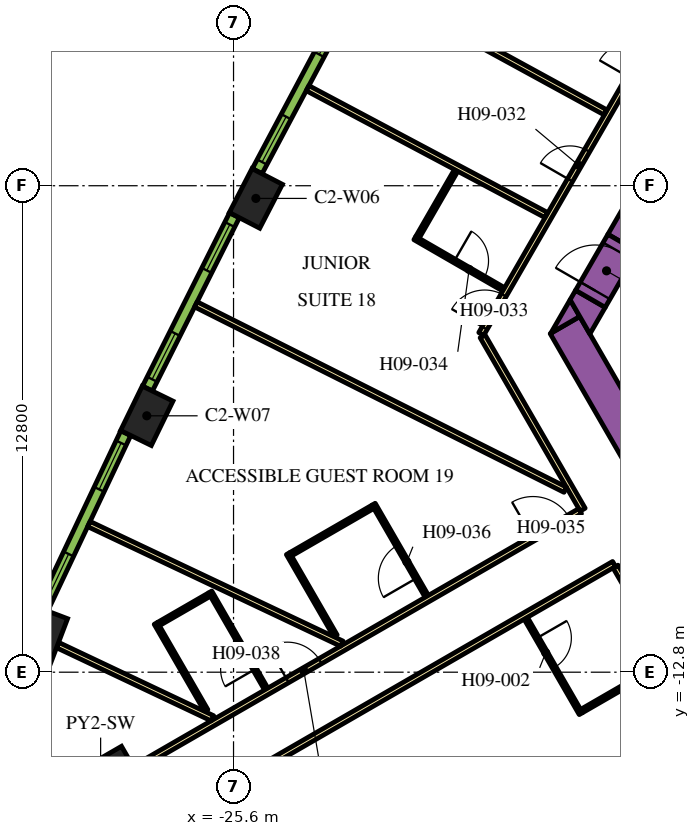
"""IFC4 building model, lengths in metres.
Left out: names, types, materials, properties, quantities, classifications, styles, units other than length and angle.
Written with IfcOpenShell. Run it as: python <this file> out.ifc"""

import sys

from ifc_helpers import new_model, si_unit, direction, frame, frame_2d, origin, origin_2d, place, context, subcontext, project, spatial, polyline, rectangle, outline, extrude, element, fill, save


model = new_model("IFC4")
c1 = context("Model", 3, precision=1e-05, world=origin(), true_north=direction((0.0, 1.0)))
c2 = subcontext(c1, "Body", "Model", "MODEL_VIEW")
j1 = project(units=[si_unit("LENGTHUNIT", "METRE"), si_unit("PLANEANGLEUNIT", "RADIAN")], contexts=[c1])
p1 = place(None, origin())
s1 = spatial("IfcSite", under=j1, at=p1, CompositionType="ELEMENT")
p2 = place(p1, origin())
s2 = spatial("IfcBuilding", under=s1, at=p2, CompositionType="ELEMENT")
p3 = place(p2, frame((0.0, 0.0, 122.7)))
s3 = spatial("IfcBuildingStorey", under=s2, at=p3, CompositionType="ELEMENT", Elevation=122.7)
p4 = place(p3, frame((-29.097, -16.799, 0.0), z_axis=(0.0, 0.0, 1.0), x_axis=(-0.866025403784, -0.5, 0.0)))
e1 = element("IfcColumn", 1, at=p4, inside=s3, PredefinedType="COLUMN", context=c2, shape_type="SweptSolid", body=[
    extrude(rectangle(XDim=3.0, YDim=3.0, at=origin_2d()), origin(), (0.0, 0.0, 1.0), 3.9),
])
for number, where, z_axis, x_axis in (
    (2, (-25.012, -0.334, 0.0), (0.0, 0.0, 1.0), (-0.459, -0.888, 0.0)),
    (3, (-27.883, -6.054, 0.0), (0.0, 0.0, 1.0), (-0.438, -0.899, 0.0)),
    (4, (-30.619, -11.839, 0.0), (0.0, 0.0, 1.0), (-0.355, -0.935, 0.0)),
):
    element("IfcColumn", number, at=place(p3, frame(where, z_axis=z_axis, x_axis=x_axis)), inside=s3, PredefinedType="COLUMN", context=c2, shape_type="SweptSolid", body=[
        extrude(rectangle(XDim=1.3, YDim=0.9, at=origin_2d()), origin(), (0.0, 0.0, 1.0), 3.9),
    ])
p5 = place(p3, frame((-15.36, -1.503, 0.0), z_axis=(0.0, 0.0, 1.0), x_axis=(0.50000389221, 0.866023156604, 0.0)))
e5 = element("IfcWall", 5, at=p5, inside=s3, PredefinedType="SOLIDWALL", context=c2, shape_type="SweptSolid", body=[
    extrude(rectangle(XDim=21.0, YDim=0.9, at=frame_2d((10.5, 0.0))), origin(), (0.0, 0.0, 1.0), 3.9),
])
p6 = place(p3, frame((-12.134, -11.883, 0.0), z_axis=(0.0, 0.0, 1.0), x_axis=(-0.500005339912, 0.866022320763, 0.0)))
e6 = element("IfcWall", 6, at=p6, inside=s3, PredefinedType="SOLIDWALL", context=c2, shape_type="SweptSolid", body=[
    extrude(rectangle(XDim=9.488, YDim=0.9, at=frame_2d((4.744, 0.0))), origin(), (0.0, 0.0, 1.0), 3.9),
])
p7 = place(p3, origin())
e7 = element("IfcWall", 7, at=p7, inside=s3, PredefinedType="SOLIDWALL", context=c2, shape_type="SweptSolid", body=[
    extrude(outline(polyline([(-16.489, -3.44), (-17.251, -3.88), (-16.743, -3.0), (-16.489, -3.44)])), origin(), (0.0, 0.0, 1.0), 3.9),
])
e8 = element("IfcWall", 8, at=p7, inside=s3, PredefinedType="SOLIDWALL", context=c2, shape_type="SweptSolid", body=[
    extrude(outline(polyline([(-15.82, -3.201), (-16.223, -3.9), (-16.743, -3.0), (-16.599, -2.751), (-15.82, -3.201)])), origin(), (0.0, 0.0, 1.0), 3.9),
])
p8 = place(p3, frame((-16.209, -2.976, 0.0), z_axis=(0.0, 0.0, 1.0), x_axis=(0.499954529098, 0.86605165483, 0.0)))
e9 = element("IfcWall", 9, at=p8, inside=s3, PredefinedType="SOLIDWALL", context=c2, shape_type="SweptSolid", body=[
    extrude(rectangle(XDim=1.7, YDim=0.9, at=frame_2d((0.85, 0.0))), origin(), (0.0, 0.0, 1.0), 3.9),
])
p9 = place(p8, frame((0.25, 0.0, 0.0)))
e10 = element("IfcOpeningElement", 10, at=p9, cuts=e9, PredefinedType="OPENING", context=c2, shape_type="SweptSolid", body=[
    extrude(rectangle(XDim=1.2, YDim=2.1, at=frame_2d((0.6, 1.05))), frame((0.0, 0.46, 0.0), z_axis=(0.0, -1.0, 0.0), x_axis=(1.0, 0.0, 0.0)), (0.0, 0.0, 1.0), 0.92),
])
p10 = place(p3, frame((-19.081, -3.9, 0.0), z_axis=(0.0, 0.0, 1.0), x_axis=(0.499998313975, 0.866026377209, 0.0)))
e11 = element("IfcWall", 11, at=p10, inside=s3, PredefinedType="PARTITIONING", context=c2, shape_type="SweptSolid", body=[
    extrude(rectangle(XDim=25.766, YDim=0.15, at=frame_2d((12.883, 0.0))), origin(), (0.0, 0.0, 1.0), 2.75),
])
p11 = place(p10, frame((19.306, 0.0, 0.0)))
e12 = element("IfcOpeningElement", 12, at=p11, cuts=e11, PredefinedType="OPENING", context=c2, shape_type="SweptSolid", body=[
    extrude(rectangle(XDim=1.0, YDim=2.1, at=frame_2d((0.5, 1.05))), frame((0.0, 0.085, 0.0), z_axis=(0.0, -1.0, 0.0), x_axis=(1.0, 0.0, 0.0)), (0.0, 0.0, 1.0), 0.17),
])
p12 = place(p10, frame((18.0, 0.0, 0.0)))
e13 = element("IfcOpeningElement", 13, at=p12, cuts=e11, PredefinedType="OPENING", context=c2, shape_type="SweptSolid", body=[
    extrude(rectangle(XDim=1.0, YDim=2.1, at=frame_2d((0.5, 1.05))), frame((0.0, 0.085, 0.0), z_axis=(0.0, -1.0, 0.0), x_axis=(1.0, 0.0, 0.0)), (0.0, 0.0, 1.0), 0.17),
])
p13 = place(p10, frame((7.793, 0.0, 0.0)))
e14 = element("IfcOpeningElement", 14, at=p13, cuts=e11, PredefinedType="OPENING", context=c2, shape_type="SweptSolid", body=[
    extrude(rectangle(XDim=0.9, YDim=2.1, at=frame_2d((0.45, 1.05))), frame((0.0, 0.085, 0.0), z_axis=(0.0, -1.0, 0.0), x_axis=(1.0, 0.0, 0.0)), (0.0, 0.0, 1.0), 0.17),
])
p14 = place(p10, frame((4.674, 0.0, 0.0)))
e15 = element("IfcOpeningElement", 15, at=p14, cuts=e11, PredefinedType="OPENING", context=c2, shape_type="SweptSolid", body=[
    extrude(rectangle(XDim=0.9, YDim=2.1, at=frame_2d((0.45, 1.05))), frame((0.0, 0.085, 0.0), z_axis=(0.0, -1.0, 0.0), x_axis=(1.0, 0.0, 0.0)), (0.0, 0.0, 1.0), 0.17),
])
p15 = place(p10, frame((0.18, 0.0, 0.0)))
e16 = element("IfcOpeningElement", 16, at=p15, cuts=e11, PredefinedType="OPENING", context=c2, shape_type="SweptSolid", body=[
    extrude(rectangle(XDim=1.0, YDim=2.1, at=frame_2d((0.5, 1.05))), frame((0.0, 0.085, 0.0), z_axis=(0.0, -1.0, 0.0), x_axis=(1.0, 0.0, 0.0)), (0.0, 0.0, 1.0), 0.17),
])
p16 = place(p3, frame((-16.412, -8.523, 0.0), z_axis=(0.0, 0.0, 1.0), x_axis=(-0.500001929737, 0.866024289647, 0.0)))
e17 = element("IfcWall", 17, at=p16, inside=s3, PredefinedType="PARTITIONING", context=c2, shape_type="SweptSolid", body=[
    extrude(rectangle(XDim=5.268, YDim=0.15, at=frame_2d((2.634, 0.0))), origin(), (0.0, 0.0, 1.0), 2.75),
])
p17 = place(p3, frame((-28.211, -15.335, 0.0), z_axis=(0.0, 0.0, 1.0), x_axis=(0.866025884867, 0.49999916674, 0.0)))
e18 = element("IfcWall", 18, at=p17, inside=s3, PredefinedType="PARTITIONING", context=c2, shape_type="SweptSolid", body=[
    extrude(rectangle(XDim=13.543, YDim=0.15, at=frame_2d((6.772, 0.0))), origin(), (0.0, 0.0, 1.0), 2.75),
])
p18 = place(p17, frame((12.114, 0.0, 0.0)))
e19 = element("IfcOpeningElement", 19, at=p18, cuts=e18, PredefinedType="OPENING", context=c2, shape_type="SweptSolid", body=[
    extrude(rectangle(XDim=1.1, YDim=2.1, at=frame_2d((0.55, 1.05))), frame((0.0, 0.085, 0.0), z_axis=(0.0, -1.0, 0.0), x_axis=(1.0, 0.0, 0.0)), (0.0, 0.0, 1.0), 0.17),
])
p19 = place(p17, frame((4.65, 0.0, 0.0)))
e20 = element("IfcOpeningElement", 20, at=p19, cuts=e18, PredefinedType="OPENING", context=c2, shape_type="SweptSolid", body=[
    extrude(rectangle(XDim=1.0, YDim=2.1, at=frame_2d((0.5, 1.05))), frame((0.0, 0.085, 0.0), z_axis=(0.0, -1.0, 0.0), x_axis=(1.0, 0.0, 0.0)), (0.0, 0.0, 1.0), 0.17),
])
p20 = place(p3, frame((-15.587, -9.952, 0.0), z_axis=(0.0, 0.0, 1.0), x_axis=(-0.866017869832, -0.500013048961, 0.0)))
e21 = element("IfcWall", 21, at=p20, inside=s3, PredefinedType="PARTITIONING", context=c2, shape_type="SweptSolid", body=[
    extrude(rectangle(XDim=13.624, YDim=0.15, at=frame_2d((6.812, 0.0))), origin(), (0.0, 0.0, 1.0), 2.75),
])
p21 = place(p20, frame((12.344, 0.0, 0.0)))
e22 = element("IfcOpeningElement", 22, at=p21, cuts=e21, PredefinedType="OPENING", context=c2, shape_type="SweptSolid", body=[
    extrude(rectangle(XDim=1.1, YDim=2.1, at=frame_2d((0.55, 1.05))), frame((0.0, 0.085, 0.0), z_axis=(0.0, -1.0, 0.0), x_axis=(1.0, 0.0, 0.0)), (0.0, 0.0, 1.0), 0.17),
])
p22 = place(p3, frame((-12.918, -14.575, 0.0), z_axis=(0.0, 0.0, 1.0), x_axis=(-0.500009150678, 0.866020120573, 0.0)))
e23 = element("IfcWall", 23, at=p22, inside=s3, PredefinedType="PARTITIONING", context=c2, shape_type="SweptSolid", body=[
    extrude(rectangle(XDim=5.258, YDim=0.15, at=frame_2d((2.629, 0.0))), origin(), (0.0, 0.0, 1.0), 2.75),
])
p23 = place(p3, frame((-30.231, -12.085, 0.0), z_axis=(0.0, 0.0, 1.0), x_axis=(0.904001132572, -0.427530060122, 0.0)))
e24 = element("IfcWall", 24, at=p23, inside=s3, PredefinedType="PARTITIONING", context=c2, shape_type="SweptSolid", body=[
    extrude(rectangle(XDim=4.51, YDim=0.15, at=frame_2d((2.255, 0.0))), origin(), (0.0, 0.0, 1.0), 2.75),
])
p24 = place(p3, frame((-29.406, -8.901, 0.0), z_axis=(0.0, 0.0, 1.0), x_axis=(0.904002363742, -0.427527456836, 0.0)))
e25 = element("IfcWall", 25, at=p24, inside=s3, PredefinedType="PARTITIONING", context=c2, shape_type="SweptSolid", body=[
    extrude(rectangle(XDim=7.362, YDim=0.15, at=frame_2d((3.681, 0.0))), origin(), (0.0, 0.0, 1.0), 2.75),
])
p25 = place(p3, frame((-23.652, 2.567, 0.0), z_axis=(0.0, 0.0, 1.0), x_axis=(0.883019237957, -0.469336793144, 0.0)))
e26 = element("IfcWall", 26, at=p25, inside=s3, PredefinedType="PARTITIONING", context=c2, shape_type="SweptSolid", body=[
    extrude(rectangle(XDim=7.111, YDim=0.15, at=frame_2d((3.555, 0.0))), origin(), (0.0, 0.0, 1.0), 2.75),
])
p26 = place(p3, frame((-26.591, -3.122, 0.0), z_axis=(0.0, 0.0, 1.0), x_axis=(0.893766213273, -0.448533115847, 0.0)))
e27 = element("IfcWall", 27, at=p26, inside=s3, PredefinedType="PARTITIONING", context=c2, shape_type="SweptSolid", body=[
    extrude(rectangle(XDim=10.875, YDim=0.15, at=frame_2d((5.438, 0.0))), origin(), (0.0, 0.0, 1.0), 2.75),
])
p27 = place(p3, frame((-21.614, 5.102, 0.0), z_axis=(0.0, 0.0, 1.0), x_axis=(0.877484555087, -0.479604895287, 0.0)))
e28 = element("IfcWall", 28, at=p27, inside=s3, PredefinedType="PARTITIONING", context=c2, shape_type="SweptSolid", body=[
    extrude(rectangle(XDim=6.611, YDim=0.15, at=frame_2d((3.306, 0.0))), origin(), (0.0, 0.0, 1.0), 2.75),
])
p28 = place(p3, frame((-17.91, -11.38, 0.0), z_axis=(0.0, 0.0, 1.0), x_axis=(0.499987231761, -0.866032775405, 0.0)))
e29 = element("IfcWall", 29, at=p28, inside=s3, PredefinedType="PARTITIONING", context=c2, shape_type="SweptSolid", body=[
    extrude(rectangle(XDim=2.9, YDim=0.1, at=frame_2d((1.45, 0.0))), origin(), (0.0, 0.0, 1.0), 2.75),
])
p29 = place(p28, frame((0.6, 0.0, 0.0)))
e30 = element("IfcOpeningElement", 30, at=p29, cuts=e29, PredefinedType="OPENING", context=c2, shape_type="SweptSolid", body=[
    extrude(rectangle(XDim=0.9, YDim=2.1, at=frame_2d((0.45, 1.05))), frame((0.0, 0.06, 0.0), z_axis=(0.0, -1.0, 0.0), x_axis=(1.0, 0.0, 0.0)), (0.0, 0.0, 1.0), 0.12),
])
p30 = place(p3, frame((-16.442, -13.823, 0.0), z_axis=(0.0, 0.0, 1.0), x_axis=(0.866021400173, 0.500006934395, 0.0)))
e31 = element("IfcWall", 31, at=p30, inside=s3, PredefinedType="PARTITIONING", context=c2, shape_type="SweptSolid", body=[
    extrude(rectangle(XDim=2.6, YDim=0.1, at=frame_2d((1.3, 0.0))), origin(), (0.0, 0.0, 1.0), 2.75),
])
p31 = place(p3, frame((-20.829, -1.377, 0.0), z_axis=(0.0, 0.0, 1.0), x_axis=(0.866036505625, -0.499980770555, 0.0)))
e32 = element("IfcWall", 32, at=p31, inside=s3, PredefinedType="PARTITIONING", context=c2, shape_type="SweptSolid", body=[
    extrude(rectangle(XDim=2.7, YDim=0.1, at=frame_2d((1.35, 0.0))), origin(), (0.0, 0.0, 1.0), 2.75),
])
p32 = place(p31, frame((1.2, 0.0, 0.0)))
e33 = element("IfcOpeningElement", 33, at=p32, cuts=e32, PredefinedType="OPENING", context=c2, shape_type="SweptSolid", body=[
    extrude(rectangle(XDim=0.9, YDim=2.1, at=frame_2d((0.45, 1.05))), frame((0.0, 0.06, 0.0), z_axis=(0.0, -1.0, 0.0), x_axis=(1.0, 0.0, 0.0)), (0.0, 0.0, 1.0), 0.12),
])
p33 = place(p3, frame((-20.761, -1.359, 0.0), z_axis=(0.0, 0.0, 1.0), x_axis=(0.499954962928, 0.866051404389, 0.0)))
e34 = element("IfcWall", 34, at=p33, inside=s3, PredefinedType="PARTITIONING", context=c2, shape_type="SweptSolid", body=[
    extrude(rectangle(XDim=2.03, YDim=0.1, at=frame_2d((1.015, 0.0))), origin(), (0.0, 0.0, 1.0), 2.75),
])
p34 = place(p3, frame((-20.515, -10.805, 0.0), z_axis=(0.0, 0.0, 1.0), x_axis=(-0.49994636267, 0.866056369097, 0.0)))
e35 = element("IfcWall", 35, at=p34, inside=s3, PredefinedType="PARTITIONING", context=c2, shape_type="SweptSolid", body=[
    extrude(rectangle(XDim=2.8, YDim=0.1, at=frame_2d((1.4, 0.0))), origin(), (0.0, 0.0, 1.0), 2.75),
])
p35 = place(p34, frame((0.55, 0.0, 0.0)))
e36 = element("IfcOpeningElement", 36, at=p35, cuts=e35, PredefinedType="OPENING", context=c2, shape_type="SweptSolid", body=[
    extrude(rectangle(XDim=1.0, YDim=2.1, at=frame_2d((0.5, 1.05))), frame((0.0, 0.06, 0.0), z_axis=(0.0, -1.0, 0.0), x_axis=(1.0, 0.0, 0.0)), (0.0, 0.0, 1.0), 0.12),
])
for number, where, z_axis, x_axis in (
    (37, (-21.933, -8.448, 0.0), (0.0, 0.0, 1.0), (-0.866, -0.5, 0.0)),
    (38, (-22.916, -11.845, 0.0), (0.0, 0.0, 1.0), (-0.5, 0.866, 0.0)),
):
    element("IfcWall", number, at=place(p3, frame(where, z_axis=z_axis, x_axis=x_axis)), inside=s3, PredefinedType="PARTITIONING", context=c2, shape_type="SweptSolid", body=[
        extrude(rectangle(XDim=2.5, YDim=0.1, at=frame_2d((1.25, 0.0))), origin(), (0.0, 0.0, 1.0), 2.75),
    ])
p36 = place(p3, frame((-24.74, -13.244, 0.0), z_axis=(0.0, 0.0, 1.0), x_axis=(-0.500037662692, 0.866003658127, 0.0)))
e39 = element("IfcWall", 39, at=p36, inside=s3, PredefinedType="PARTITIONING", context=c2, shape_type="SweptSolid", body=[
    extrude(rectangle(XDim=2.95, YDim=0.1, at=frame_2d((1.475, 0.0))), origin(), (0.0, 0.0, 1.0), 2.75),
])
p37 = place(p36, frame((0.6, 0.0, 0.0)))
e40 = element("IfcOpeningElement", 40, at=p37, cuts=e39, PredefinedType="OPENING", context=c2, shape_type="SweptSolid", body=[
    extrude(rectangle(XDim=0.9, YDim=2.1, at=frame_2d((0.45, 1.05))), frame((0.0, 0.06, 0.0), z_axis=(0.0, -1.0, 0.0), x_axis=(1.0, 0.0, 0.0)), (0.0, 0.0, 1.0), 0.12),
])
p38 = place(p3, frame((-26.233, -10.758, 0.0), z_axis=(0.0, 0.0, 1.0), x_axis=(-0.866043940782, -0.499967891604, 0.0)))
e41 = element("IfcWall", 41, at=p38, inside=s3, PredefinedType="PARTITIONING", context=c2, shape_type="SweptSolid", body=[
    extrude(rectangle(XDim=1.55, YDim=0.1, at=frame_2d((0.775, 0.0))), origin(), (0.0, 0.0, 1.0), 2.75),
])
p39 = place(p3, frame((-26.319, -13.81, 0.0), z_axis=(0.0, 0.0, 1.0), x_axis=(-0.499953715521, 0.866052124492, 0.0)))
e42 = element("IfcWall", 42, at=p39, inside=s3, PredefinedType="PARTITIONING", context=c2, shape_type="SweptSolid", body=[
    extrude(rectangle(XDim=2.65, YDim=0.1, at=frame_2d((1.325, 0.0))), origin(), (0.0, 0.0, 1.0), 2.75),
])
p40 = place(p3, frame((-22.583, 4.887, 0.0), z_axis=(0.0, 0.0, 1.0), x_axis=(-0.469323203119, -0.883026461106, 0.0)))
e43 = element("IfcWall", 43, at=p40, inside=s3, PredefinedType="SOLIDWALL", context=c2, shape_type="SweptSolid", body=[
    extrude(rectangle(XDim=5.101, YDim=0.29, at=frame_2d((2.55, 0.0))), origin(), (0.0, 0.0, 1.0), 3.65),
])
p41 = place(p40, frame((0.273, 0.0, 0.9)))
e44 = element("IfcOpeningElement", 44, at=p41, cuts=e43, PredefinedType="OPENING", context=c2, shape_type="SweptSolid", body=[
    extrude(rectangle(XDim=1.35, YDim=2.15, at=frame_2d((0.675, 1.075))), frame((0.0, 0.155, 0.0), z_axis=(0.0, -1.0, 0.0), x_axis=(1.0, 0.0, 0.0)), (0.0, 0.0, 1.0), 0.31),
])
p42 = place(p40, frame((3.478, 0.0, 0.9)))
e45 = element("IfcOpeningElement", 45, at=p42, cuts=e43, PredefinedType="OPENING", context=c2, shape_type="SweptSolid", body=[
    extrude(rectangle(XDim=1.35, YDim=2.15, at=frame_2d((0.675, 1.075))), frame((0.0, 0.155, 0.0), z_axis=(0.0, -1.0, 0.0), x_axis=(1.0, 0.0, 0.0)), (0.0, 0.0, 1.0), 0.31),
])
p43 = place(p3, frame((-25.576, -0.778, 0.0), z_axis=(0.0, 0.0, 1.0), x_axis=(-0.448534297211, -0.893765620409, 0.0)))
e46 = element("IfcWall", 46, at=p43, inside=s3, PredefinedType="SOLIDWALL", context=c2, shape_type="SweptSolid", body=[
    extrude(rectangle(XDim=5.1, YDim=0.29, at=frame_2d((2.55, 0.0))), origin(), (0.0, 0.0, 1.0), 3.65),
])
p44 = place(p43, frame((0.272, 0.0, 0.9)))
e47 = element("IfcOpeningElement", 47, at=p44, cuts=e46, PredefinedType="OPENING", context=c2, shape_type="SweptSolid", body=[
    extrude(rectangle(XDim=1.35, YDim=2.15, at=frame_2d((0.675, 1.075))), frame((0.0, 0.155, 0.0), z_axis=(0.0, -1.0, 0.0), x_axis=(1.0, 0.0, 0.0)), (0.0, 0.0, 1.0), 0.31),
])
p45 = place(p43, frame((3.478, 0.0, 0.9)))
e48 = element("IfcOpeningElement", 48, at=p45, cuts=e46, PredefinedType="OPENING", context=c2, shape_type="SweptSolid", body=[
    extrude(rectangle(XDim=1.35, YDim=2.15, at=frame_2d((0.675, 1.075))), frame((0.0, 0.155, 0.0), z_axis=(0.0, -1.0, 0.0), x_axis=(1.0, 0.0, 0.0)), (0.0, 0.0, 1.0), 0.31),
])
p46 = place(p3, frame((-28.436, -6.511, 0.0), z_axis=(0.0, 0.0, 1.0), x_axis=(-0.427543726596, -0.903994669148, 0.0)))
e49 = element("IfcWall", 49, at=p46, inside=s3, PredefinedType="SOLIDWALL", context=c2, shape_type="SweptSolid", body=[
    extrude(rectangle(XDim=5.107, YDim=0.29, at=frame_2d((2.553, 0.0))), origin(), (0.0, 0.0, 1.0), 3.65),
])
p47 = place(p46, frame((0.285, 0.0, 0.9)))
e50 = element("IfcOpeningElement", 50, at=p47, cuts=e49, PredefinedType="OPENING", context=c2, shape_type="SweptSolid", body=[
    extrude(rectangle(XDim=1.35, YDim=2.15, at=frame_2d((0.675, 1.075))), frame((0.0, 0.155, 0.0), z_axis=(0.0, -1.0, 0.0), x_axis=(1.0, 0.0, 0.0)), (0.0, 0.0, 1.0), 0.31),
])
p48 = place(p46, frame((3.516, 0.0, 0.9)))
e51 = element("IfcOpeningElement", 51, at=p48, cuts=e49, PredefinedType="OPENING", context=c2, shape_type="SweptSolid", body=[
    extrude(rectangle(XDim=1.35, YDim=2.15, at=frame_2d((0.675, 1.075))), frame((0.0, 0.155, 0.0), z_axis=(0.0, -1.0, 0.0), x_axis=(1.0, 0.0, 0.0)), (0.0, 0.0, 1.0), 0.31),
])
p49 = place(p9, origin())
e52 = element("IfcDoor", 52, at=p49, inside=s3, OperationType="SINGLE_SWING_LEFT", PredefinedType="DOOR", context=c2, shape_type="SweptSolid", body=[
    extrude(rectangle(XDim=1.2, YDim=2.1, at=frame_2d((0.6, 1.05))), frame((0.0, 0.025, 0.0), z_axis=(0.0, -1.0, 0.0), x_axis=(1.0, 0.0, 0.0)), (0.0, 0.0, 1.0), 0.05),
])
fill(e10, e52)
p50 = place(p29, origin())
e53 = element("IfcDoor", 53, at=p50, inside=s3, OperationType="SINGLE_SWING_LEFT", PredefinedType="DOOR", context=c2, shape_type="SweptSolid", body=[
    extrude(rectangle(XDim=0.9, YDim=2.1, at=frame_2d((0.45, 1.05))), frame((0.0, 0.025, 0.0), z_axis=(0.0, -1.0, 0.0), x_axis=(1.0, 0.0, 0.0)), (0.0, 0.0, 1.0), 0.05),
])
fill(e30, e53)
p51 = place(p14, origin())
e54 = element("IfcDoor", 54, at=p51, inside=s3, OperationType="SINGLE_SWING_LEFT", PredefinedType="DOOR", context=c2, shape_type="SweptSolid", body=[
    extrude(rectangle(XDim=0.9, YDim=2.1, at=frame_2d((0.45, 1.05))), frame((0.0, 0.025, 0.0), z_axis=(0.0, -1.0, 0.0), x_axis=(1.0, 0.0, 0.0)), (0.0, 0.0, 1.0), 0.05),
])
fill(e15, e54)
p52 = place(p15, origin())
e55 = element("IfcDoor", 55, at=p52, inside=s3, OperationType="SINGLE_SWING_LEFT", PredefinedType="DOOR", context=c2, shape_type="SweptSolid", body=[
    extrude(rectangle(XDim=1.0, YDim=2.1, at=frame_2d((0.5, 1.05))), frame((0.0, 0.025, 0.0), z_axis=(0.0, -1.0, 0.0), x_axis=(1.0, 0.0, 0.0)), (0.0, 0.0, 1.0), 0.05),
])
fill(e16, e55)
p53 = place(p32, origin())
e56 = element("IfcDoor", 56, at=p53, inside=s3, OperationType="SINGLE_SWING_RIGHT", PredefinedType="DOOR", context=c2, shape_type="SweptSolid", body=[
    extrude(rectangle(XDim=0.9, YDim=2.1, at=frame_2d((0.45, 1.05))), frame((0.0, 0.025, 0.0), z_axis=(0.0, -1.0, 0.0), x_axis=(1.0, 0.0, 0.0)), (0.0, 0.0, 1.0), 0.05),
])
fill(e33, e56)
p54 = place(p18, origin())
e57 = element("IfcDoor", 57, at=p54, inside=s3, OperationType="SINGLE_SWING_RIGHT", PredefinedType="DOOR", context=c2, shape_type="SweptSolid", body=[
    extrude(rectangle(XDim=1.1, YDim=2.1, at=frame_2d((0.55, 1.05))), frame((0.0, 0.025, 0.0), z_axis=(0.0, -1.0, 0.0), x_axis=(1.0, 0.0, 0.0)), (0.0, 0.0, 1.0), 0.05),
])
fill(e19, e57)
p55 = place(p35, origin())
e58 = element("IfcDoor", 58, at=p55, inside=s3, OperationType="SINGLE_SWING_LEFT", PredefinedType="DOOR", context=c2, shape_type="SweptSolid", body=[
    extrude(rectangle(XDim=1.0, YDim=2.1, at=frame_2d((0.5, 1.05))), frame((0.0, 0.025, 0.0), z_axis=(0.0, -1.0, 0.0), x_axis=(1.0, 0.0, 0.0)), (0.0, 0.0, 1.0), 0.05),
])
fill(e36, e58)
p56 = place(p19, origin())
e59 = element("IfcDoor", 59, at=p56, inside=s3, OperationType="SINGLE_SWING_RIGHT", PredefinedType="DOOR", context=c2, shape_type="SweptSolid", body=[
    extrude(rectangle(XDim=1.0, YDim=2.1, at=frame_2d((0.5, 1.05))), frame((0.0, 0.025, 0.0), z_axis=(0.0, -1.0, 0.0), x_axis=(1.0, 0.0, 0.0)), (0.0, 0.0, 1.0), 0.05),
])
fill(e20, e59)
p57 = place(p37, origin())
e60 = element("IfcDoor", 60, at=p57, inside=s3, OperationType="SINGLE_SWING_LEFT", PredefinedType="DOOR", context=c2, shape_type="SweptSolid", body=[
    extrude(rectangle(XDim=0.9, YDim=2.1, at=frame_2d((0.45, 1.05))), frame((0.0, 0.025, 0.0), z_axis=(0.0, -1.0, 0.0), x_axis=(1.0, 0.0, 0.0)), (0.0, 0.0, 1.0), 0.05),
])
fill(e40, e60)
p58 = place(p41, origin())
e61 = element("IfcWindow", 61, at=p58, inside=s3, PartitioningType="DOUBLE_PANEL_VERTICAL", PredefinedType="WINDOW", context=c2, shape_type="SweptSolid", body=[
    extrude(rectangle(XDim=1.35, YDim=2.15, at=frame_2d((0.675, 1.075))), frame((0.0, 0.015, 0.0), z_axis=(0.0, -1.0, 0.0), x_axis=(1.0, 0.0, 0.0)), (0.0, 0.0, 1.0), 0.06),
])
fill(e44, e61)
p59 = place(p42, origin())
e62 = element("IfcWindow", 62, at=p59, inside=s3, PartitioningType="DOUBLE_PANEL_VERTICAL", PredefinedType="WINDOW", context=c2, shape_type="SweptSolid", body=[
    extrude(rectangle(XDim=1.35, YDim=2.15, at=frame_2d((0.675, 1.075))), frame((0.0, 0.015, 0.0), z_axis=(0.0, -1.0, 0.0), x_axis=(1.0, 0.0, 0.0)), (0.0, 0.0, 1.0), 0.06),
])
fill(e45, e62)
p60 = place(p44, origin())
e63 = element("IfcWindow", 63, at=p60, inside=s3, PartitioningType="DOUBLE_PANEL_VERTICAL", PredefinedType="WINDOW", context=c2, shape_type="SweptSolid", body=[
    extrude(rectangle(XDim=1.35, YDim=2.15, at=frame_2d((0.675, 1.075))), frame((0.0, 0.015, 0.0), z_axis=(0.0, -1.0, 0.0), x_axis=(1.0, 0.0, 0.0)), (0.0, 0.0, 1.0), 0.06),
])
fill(e47, e63)
p61 = place(p45, origin())
e64 = element("IfcWindow", 64, at=p61, inside=s3, PartitioningType="DOUBLE_PANEL_VERTICAL", PredefinedType="WINDOW", context=c2, shape_type="SweptSolid", body=[
    extrude(rectangle(XDim=1.35, YDim=2.15, at=frame_2d((0.675, 1.075))), frame((0.0, 0.015, 0.0), z_axis=(0.0, -1.0, 0.0), x_axis=(1.0, 0.0, 0.0)), (0.0, 0.0, 1.0), 0.06),
])
fill(e48, e64)
p62 = place(p47, origin())
e65 = element("IfcWindow", 65, at=p62, inside=s3, PartitioningType="DOUBLE_PANEL_VERTICAL", PredefinedType="WINDOW", context=c2, shape_type="SweptSolid", body=[
    extrude(rectangle(XDim=1.35, YDim=2.15, at=frame_2d((0.675, 1.075))), frame((0.0, 0.015, 0.0), z_axis=(0.0, -1.0, 0.0), x_axis=(1.0, 0.0, 0.0)), (0.0, 0.0, 1.0), 0.06),
])
fill(e50, e65)
p63 = place(p48, origin())
e66 = element("IfcWindow", 66, at=p63, inside=s3, PartitioningType="DOUBLE_PANEL_VERTICAL", PredefinedType="WINDOW", context=c2, shape_type="SweptSolid", body=[
    extrude(rectangle(XDim=1.35, YDim=2.15, at=frame_2d((0.675, 1.075))), frame((0.0, 0.015, 0.0), z_axis=(0.0, -1.0, 0.0), x_axis=(1.0, 0.0, 0.0)), (0.0, 0.0, 1.0), 0.06),
])
fill(e51, e66)
save(model, sys.argv[1])
